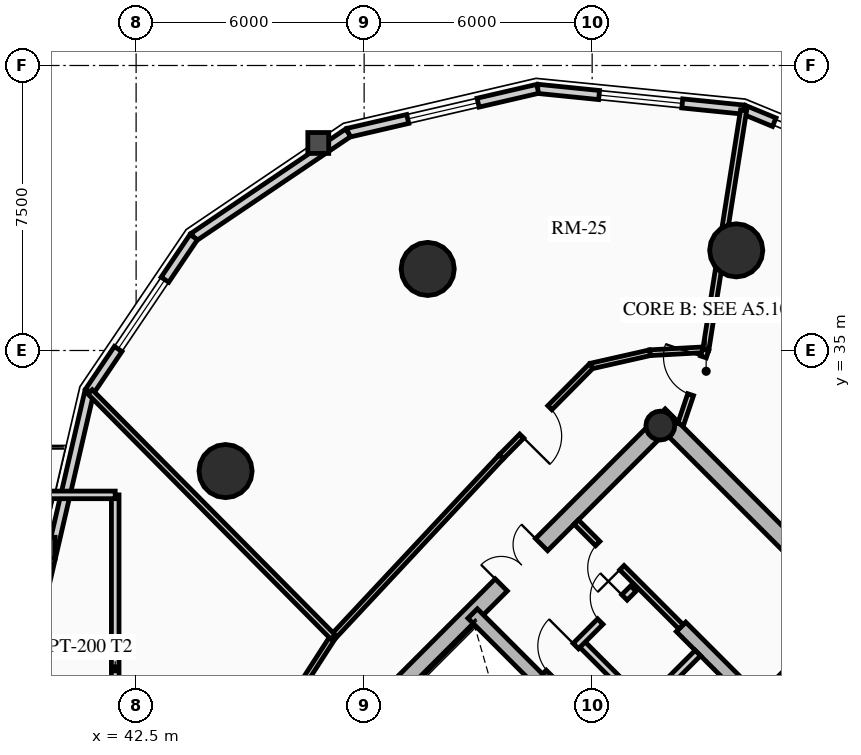
"""IFC4 building model, lengths in metres.
Left out: names, types, materials, properties, quantities, classifications, styles, units other than length and angle.
Written with IfcOpenShell. Run it as: python <this file> out.ifc"""

import sys

from ifc_helpers import new_model, si_unit, direction, frame, frame_2d, origin, origin_2d, place, context, subcontext, project, spatial, rectangle, circle, hollow_circle, extrude, source, transform, mapped, element, fill, save


model = new_model("IFC4")
c1 = context("Model", 3, precision=1e-05, world=origin(), true_north=direction((0.0, 1.0)))
c2 = subcontext(c1, "Body", "Model", "MODEL_VIEW")
j1 = project(units=[si_unit("LENGTHUNIT", "METRE"), si_unit("PLANEANGLEUNIT", "RADIAN")], contexts=[c1])
p1 = place(None, origin())
s1 = spatial("IfcSite", under=j1, at=p1, CompositionType="ELEMENT")
p2 = place(p1, origin())
s2 = spatial("IfcBuilding", under=s1, at=p2, CompositionType="ELEMENT")
p3 = place(p2, frame((0.0, 0.0, 136.6)))
s3 = spatial("IfcBuildingStorey", under=s2, at=p3, CompositionType="ELEMENT", Elevation=136.6)
p4 = place(p3, frame((66.303, 23.263, 0.0), z_axis=(0.0, 0.0, 1.0), x_axis=(-0.707106781187, 0.707106781187, 0.0)))
e1 = element("IfcWall", 1, at=p4, inside=s3, PredefinedType="SHEAR", context=c2, shape_type="SweptSolid", body=[
    extrude(rectangle(XDim=14.2, YDim=0.45, at=frame_2d((7.1, 0.0))), origin(), (0.0, 0.0, 1.0), 3.72),
])
p5 = place(p3, frame((48.856, 25.578, 0.0), z_axis=(0.0, 0.0, 1.0), x_axis=(0.707106781187, 0.707106781187, 0.0)))
e2 = element("IfcWall", 2, at=p5, inside=s3, PredefinedType="SHEAR", context=c2, shape_type="SweptSolid", body=[
    extrude(rectangle(XDim=10.7, YDim=0.45, at=frame_2d((5.35, 0.0))), origin(), (0.0, 0.0, 1.0), 3.72),
])
m1 = source(origin(), c2, "Body", "SweptSolid", [
    extrude(rectangle(XDim=1.5, YDim=2.02, at=frame_2d((0.75, 1.01))), frame((0.0, 0.235, 0.0), z_axis=(0.0, -1.0, 0.0), x_axis=(1.0, 0.0, 0.0)), (0.0, 0.0, 1.0), 0.47),
])
p6 = place(p5, frame((4.6, 0.0, 0.0)))
e3 = element("IfcOpeningElement", 3, at=p6, cuts=e2, PredefinedType="OPENING", context=c2, shape_type="MappedRepresentation", body=[
    mapped(m1, transform((0.0, 0.0, 0.0), x_axis=(1.0, 0.0, 0.0), y_axis=(0.0, 1.0, 0.0), z_axis=(0.0, 0.0, 1.0), scale=1.0)),
])
p7 = place(p3, frame((61.078, 18.355, 0.0), z_axis=(0.0, 0.0, 1.0), x_axis=(-0.707106781187, 0.707106781187, 0.0)))
e4 = element("IfcWall", 4, at=p7, inside=s3, PredefinedType="SHEAR", context=c2, shape_type="SweptSolid", body=[
    extrude(rectangle(XDim=13.75, YDim=0.35, at=frame_2d((6.875, 0.0))), origin(), (0.0, 0.0, 1.0), 3.72),
])
m2 = source(origin(), c2, "Body", "SweptSolid", [
    extrude(rectangle(XDim=1.1, YDim=2.015, at=frame_2d((0.55, 1.007))), frame((0.0, 0.185, 0.0), z_axis=(0.0, -1.0, 0.0), x_axis=(1.0, 0.0, 0.0)), (0.0, 0.0, 1.0), 0.37),
])
p8 = place(p7, frame((4.875, 0.0, 0.0)))
e5 = element("IfcOpeningElement", 5, at=p8, cuts=e4, PredefinedType="OPENING", context=c2, shape_type="MappedRepresentation", body=[
    mapped(m2, transform((0.0, 0.0, 0.0), x_axis=(1.0, 0.0, 0.0), y_axis=(0.0, 1.0, 0.0), z_axis=(0.0, 0.0, 1.0), scale=1.0)),
])
p9 = place(p7, frame((0.65, 0.0, 0.0)))
e6 = element("IfcOpeningElement", 6, at=p9, cuts=e4, PredefinedType="OPENING", context=c2, shape_type="MappedRepresentation", body=[
    mapped(m2, transform((0.0, 0.0, 0.0), x_axis=(1.0, 0.0, 0.0), y_axis=(0.0, 1.0, 0.0), z_axis=(0.0, 0.0, 1.0), scale=1.0)),
])
p10 = place(p7, frame((2.65, 0.0, 0.0)))
e7 = element("IfcOpeningElement", 7, at=p10, cuts=e4, PredefinedType="OPENING", context=c2, shape_type="MappedRepresentation", body=[
    mapped(m2, transform((0.0, 0.0, 0.0), x_axis=(1.0, 0.0, 0.0), y_axis=(0.0, 1.0, 0.0), z_axis=(0.0, 0.0, 1.0), scale=1.0)),
])
m3 = source(origin(), c2, "Body", "SweptSolid", [
    extrude(rectangle(XDim=1.15, YDim=2.02, at=frame_2d((0.575, 1.01))), frame((0.0, 0.185, 0.0), z_axis=(0.0, -1.0, 0.0), x_axis=(1.0, 0.0, 0.0)), (0.0, 0.0, 1.0), 0.37),
])
p11 = place(p7, frame((7.295, 0.0, 0.0)))
e8 = element("IfcOpeningElement", 8, at=p11, cuts=e4, PredefinedType="OPENING", context=c2, shape_type="MappedRepresentation", body=[
    mapped(m3, transform((0.0, 0.0, 0.0), x_axis=(1.0, 0.0, 0.0), y_axis=(0.0, 1.0, 0.0), z_axis=(0.0, 0.0, 1.0), scale=1.0)),
])
p12 = place(p3, frame((63.645, 20.922, 0.0), z_axis=(0.0, 0.0, 1.0), x_axis=(-0.70711946392, 0.707094098226, 0.0)))
e9 = element("IfcWall", 9, at=p12, inside=s3, PredefinedType="SHEAR", context=c2, shape_type="SweptSolid", body=[
    extrude(rectangle(XDim=9.625, YDim=0.35, at=frame_2d((4.812, 0.0))), origin(), (0.0, 0.0, 1.0), 3.72),
])
p13 = place(p12, frame((5.305, 0.0, 0.0)))
e10 = element("IfcOpeningElement", 10, at=p13, cuts=e9, PredefinedType="OPENING", context=c2, shape_type="MappedRepresentation", body=[
    mapped(m3, transform((0.0, 0.0, 0.0), x_axis=(1.0, 0.0, 0.0), y_axis=(0.0, 1.0, 0.0), z_axis=(0.0, 0.0, 1.0), scale=1.0)),
])
p14 = place(p3, frame((58.893, 25.674, 0.0), z_axis=(0.0, 0.0, 1.0), x_axis=(0.707106781187, 0.707106781187, 0.0)))
e11 = element("IfcWall", 11, at=p14, inside=s3, PredefinedType="SHEAR", context=c2, shape_type="SweptSolid", body=[
    extrude(rectangle(XDim=3.285, YDim=0.35, at=frame_2d((1.643, 0.0))), origin(), (0.0, 0.0, 1.0), 3.72),
])
p15 = place(p3, frame((56.294, 33.024, 0.0), z_axis=(0.0, 0.0, 1.0), x_axis=(0.707106781187, 0.707106781187, 0.0)))
e12 = element("IfcColumn", 12, at=p15, inside=s3, PredefinedType="COLUMN", context=c2, shape_type="SweptSolid", body=[
    extrude(hollow_circle(Radius=0.38, WallThickness=0.032, at=origin_2d()), origin(), (0.0, 0.0, 1.0), 3.72),
])
for number, where, z_axis, x_axis in (
    (13, (58.291, 37.635, 0.0), (0.0, 0.0, 1.0), (1.0, 0.0, 0.0)),
    (14, (50.173, 37.146, 0.0), (0.0, 0.0, 1.0), (1.0, 0.0, 0.0)),
    (15, (44.854, 31.827, 0.0), (0.0, 0.0, 1.0), (1.0, 0.0, 0.0)),
):
    element("IfcColumn", number, at=place(p3, frame(where, z_axis=z_axis, x_axis=x_axis)), inside=s3, PredefinedType="USERDEFINED", context=c2, shape_type="SweptSolid", body=[
        extrude(circle(Radius=0.7, at=origin_2d()), origin(), (0.0, 0.0, 1.0), 3.72),
    ])
p16 = place(p3, frame((58.487, 41.339, 0.0), z_axis=(0.0, 0.0, 1.0), x_axis=(0.924556017656, -0.381046152345, 0.0)))
e16 = element("IfcWall", 16, at=p16, inside=s3, PredefinedType="SOLIDWALL", context=c2, shape_type="SweptSolid", body=[
    extrude(rectangle(XDim=0.87, YDim=0.24, at=frame_2d((0.435, 0.0))), origin(), (0.0, 0.0, 1.0), 2.949),
])
p17 = place(p3, frame((53.067, 41.885, 0.0), z_axis=(0.0, 0.0, 1.0), x_axis=(0.994971754311, -0.10015591906, 0.0)))
e17 = element("IfcWall", 17, at=p17, inside=s3, PredefinedType="SOLIDWALL", context=c2, shape_type="SweptSolid", body=[
    extrude(rectangle(XDim=5.448, YDim=0.24, at=frame_2d((2.724, 0.0))), origin(), (0.0, 0.0, 1.0), 2.949),
])
m4 = source(origin(), c2, "Body", "SweptSolid", [
    extrude(rectangle(XDim=2.2, YDim=1.35, at=frame_2d((1.1, 0.675))), frame((0.0, 0.13, 0.0), z_axis=(0.0, -1.0, 0.0), x_axis=(1.0, 0.0, 0.0)), (0.0, 0.0, 1.0), 0.26),
])
p18 = place(p17, frame((1.624, 0.0, 0.65)))
e18 = element("IfcOpeningElement", 18, at=p18, cuts=e17, PredefinedType="OPENING", context=c2, shape_type="MappedRepresentation", body=[
    mapped(m4, transform((0.0, 0.0, 0.0), x_axis=(1.0, 0.0, 0.0), y_axis=(0.0, 1.0, 0.0), z_axis=(0.0, 0.0, 1.0), scale=1.0)),
])
p19 = place(p3, frame((48.08, 40.729, 0.0), z_axis=(0.0, 0.0, 1.0), x_axis=(0.974165631126, 0.225834725257, 0.0)))
e19 = element("IfcWall", 19, at=p19, inside=s3, PredefinedType="SOLIDWALL", context=c2, shape_type="SweptSolid", body=[
    extrude(rectangle(XDim=5.119, YDim=0.24, at=frame_2d((2.56, 0.0))), origin(), (0.0, 0.0, 1.0), 2.949),
])
m5 = source(origin(), c2, "Body", "SweptSolid", [
    extrude(rectangle(XDim=1.9, YDim=1.35, at=frame_2d((0.95, 0.675))), frame((0.0, 0.13, 0.0), z_axis=(0.0, -1.0, 0.0), x_axis=(1.0, 0.0, 0.0)), (0.0, 0.0, 1.0), 0.26),
])
p20 = place(p19, frame((1.609, 0.0, 0.65)))
e20 = element("IfcOpeningElement", 20, at=p20, cuts=e19, PredefinedType="OPENING", context=c2, shape_type="MappedRepresentation", body=[
    mapped(m5, transform((0.0, 0.0, 0.0), x_axis=(1.0, 0.0, 0.0), y_axis=(0.0, 1.0, 0.0), z_axis=(0.0, 0.0, 1.0), scale=1.0)),
])
p21 = place(p3, frame((44.015, 37.985, 0.0), z_axis=(0.0, 0.0, 1.0), x_axis=(0.828781148131, 0.559572880421, 0.0)))
e21 = element("IfcWall", 21, at=p21, inside=s3, PredefinedType="SOLIDWALL", context=c2, shape_type="SweptSolid", body=[
    extrude(rectangle(XDim=4.905, YDim=0.24, at=frame_2d((2.452, 0.0))), origin(), (0.0, 0.0, 1.0), 2.949),
])
p22 = place(p3, frame((41.271, 33.92, 0.0), z_axis=(0.0, 0.0, 1.0), x_axis=(0.559572880421, 0.828781148131, 0.0)))
e22 = element("IfcWall", 22, at=p22, inside=s3, PredefinedType="SOLIDWALL", context=c2, shape_type="SweptSolid", body=[
    extrude(rectangle(XDim=4.905, YDim=0.24, at=frame_2d((2.452, 0.0))), origin(), (0.0, 0.0, 1.0), 2.949),
])
p23 = place(p22, frame((1.352, 0.0, 0.65)))
e23 = element("IfcOpeningElement", 23, at=p23, cuts=e22, PredefinedType="OPENING", context=c2, shape_type="MappedRepresentation", body=[
    mapped(m4, transform((0.0, 0.0, 0.0), x_axis=(1.0, 0.0, 0.0), y_axis=(0.0, 1.0, 0.0), z_axis=(0.0, 0.0, 1.0), scale=1.0)),
])
p24 = place(p3, frame((40.115, 28.933, 0.0), z_axis=(0.0, 0.0, 1.0), x_axis=(0.225834725257, 0.974165631126, 0.0)))
e24 = element("IfcWall", 24, at=p24, inside=s3, PredefinedType="SOLIDWALL", context=c2, shape_type="SweptSolid", body=[
    extrude(rectangle(XDim=5.119, YDim=0.24, at=frame_2d((2.56, 0.0))), origin(), (0.0, 0.0, 1.0), 2.949),
])
p25 = place(p3, frame((41.95, 17.8, 0.0), z_axis=(0.0, 0.0, 1.0), x_axis=(0.0, 1.0, 0.0)))
e25 = element("IfcWall", 25, at=p25, inside=s3, PredefinedType="PARTITIONING", context=c2, shape_type="SweptSolid", body=[
    extrude(rectangle(XDim=13.4, YDim=0.2, at=frame_2d((6.7, 0.0))), origin(), (0.0, 0.0, 1.0), 2.949),
])
m6 = source(origin(), c2, "Body", "SweptSolid", [
    extrude(rectangle(XDim=1.8, YDim=2.05, at=frame_2d((0.9, 1.025))), frame((0.0, 0.11, 0.0), z_axis=(0.0, -1.0, 0.0), x_axis=(1.0, 0.0, 0.0)), (0.0, 0.0, 1.0), 0.22),
])
p26 = place(p25, frame((2.1, 0.0, 0.0)))
e26 = element("IfcOpeningElement", 26, at=p26, cuts=e25, PredefinedType="OPENING", context=c2, shape_type="MappedRepresentation", body=[
    mapped(m6, transform((0.0, 0.0, 0.0), x_axis=(1.0, 0.0, 0.0), y_axis=(0.0, 1.0, 0.0), z_axis=(0.0, 0.0, 1.0), scale=1.0)),
])
p27 = place(p3, frame((39.85, 31.2, 0.0), z_axis=(0.0, 0.0, 1.0), x_axis=(1.0, 0.0, 0.0)))
e27 = element("IfcWall", 27, at=p27, inside=s3, PredefinedType="PARTITIONING", context=c2, shape_type="SweptSolid", body=[
    extrude(rectangle(XDim=2.1, YDim=0.2, at=frame_2d((1.05, 0.0))), origin(), (0.0, 0.0, 1.0), 2.949),
])
p28 = place(p3, frame((54.961, 24.719, 0.0), z_axis=(0.0, 0.0, 1.0), x_axis=(0.707106781187, 0.707106781187, 0.0)))
e28 = element("IfcWall", 28, at=p28, inside=s3, PredefinedType="PARTITIONING", context=c2, shape_type="SweptSolid", body=[
    extrude(rectangle(XDim=3.28, YDim=0.2, at=frame_2d((1.64, 0.0))), origin(), (0.0, 0.0, 1.0), 3.425),
])
m7 = source(origin(), c2, "Body", "SweptSolid", [
    extrude(rectangle(XDim=0.9, YDim=2.005, at=frame_2d((0.45, 1.002))), frame((0.0, 0.11, 0.0), z_axis=(0.0, -1.0, 0.0), x_axis=(1.0, 0.0, 0.0)), (0.0, 0.0, 1.0), 0.22),
])
p29 = place(p28, frame((0.16, 0.0, 0.0)))
e29 = element("IfcOpeningElement", 29, at=p29, cuts=e28, PredefinedType="OPENING", context=c2, shape_type="MappedRepresentation", body=[
    mapped(m7, transform((0.0, 0.0, 0.0), x_axis=(1.0, 0.0, 0.0), y_axis=(0.0, 1.0, 0.0), z_axis=(0.0, 0.0, 1.0), scale=1.0)),
])
p30 = place(p3, frame((55.874, 25.631, 0.0), z_axis=(0.0, 0.0, 1.0), x_axis=(-0.707157639372, 0.707055919343, 0.0)))
e30 = element("IfcWall", 30, at=p30, inside=s3, PredefinedType="PARTITIONING", context=c2, shape_type="SweptSolid", body=[
    extrude(rectangle(XDim=2.4, YDim=0.2, at=frame_2d((1.2, 0.0))), origin(), (0.0, 0.0, 1.0), 3.425),
])
p31 = place(p3, frame((53.264, 26.416, 0.0), z_axis=(0.0, 0.0, 1.0), x_axis=(0.707106781187, 0.707106781187, 0.0)))
e31 = element("IfcWall", 31, at=p31, inside=s3, PredefinedType="PARTITIONING", context=c2, shape_type="SweptSolid", body=[
    extrude(rectangle(XDim=3.28, YDim=0.2, at=frame_2d((1.64, 0.0))), origin(), (0.0, 0.0, 1.0), 3.425),
])
m8 = source(origin(), c2, "Body", "SweptSolid", [
    extrude(rectangle(XDim=1.0, YDim=2.015, at=frame_2d((0.5, 1.007))), frame((0.0, 0.11, 0.0), z_axis=(0.0, -1.0, 0.0), x_axis=(1.0, 0.0, 0.0)), (0.0, 0.0, 1.0), 0.22),
])
p32 = place(p31, frame((0.14, 0.0, 0.0)))
e32 = element("IfcOpeningElement", 32, at=p32, cuts=e31, PredefinedType="OPENING", context=c2, shape_type="MappedRepresentation", body=[
    mapped(m8, transform((0.0, 0.0, 0.0), x_axis=(1.0, 0.0, 0.0), y_axis=(0.0, 1.0, 0.0), z_axis=(0.0, 0.0, 1.0), scale=1.0)),
])
p33 = place(p31, frame((2.05, 0.0, 0.0)))
e33 = element("IfcOpeningElement", 33, at=p33, cuts=e31, PredefinedType="OPENING", context=c2, shape_type="MappedRepresentation", body=[
    mapped(m7, transform((0.0, 0.0, 0.0), x_axis=(1.0, 0.0, 0.0), y_axis=(0.0, 1.0, 0.0), z_axis=(0.0, 0.0, 1.0), scale=1.0)),
])
p34 = place(p3, frame((56.839, 27.728, 0.0), z_axis=(0.0, 0.0, 1.0), x_axis=(-0.707106781187, 0.707106781187, 0.0)))
e34 = element("IfcWall", 34, at=p34, inside=s3, PredefinedType="PARTITIONING", context=c2, shape_type="SweptSolid", body=[
    extrude(rectangle(XDim=3.9, YDim=0.16, at=frame_2d((1.95, 0.0))), origin(), (0.0, 0.0, 1.0), 3.425),
])
m9 = source(origin(), c2, "Body", "SweptSolid", [
    extrude(rectangle(XDim=0.9, YDim=2.005, at=frame_2d((0.45, 1.002))), frame((0.0, 0.09, 0.0), z_axis=(0.0, -1.0, 0.0), x_axis=(1.0, 0.0, 0.0)), (0.0, 0.0, 1.0), 0.18),
])
p35 = place(p34, frame((2.2, 0.0, 0.0)))
e35 = element("IfcOpeningElement", 35, at=p35, cuts=e34, PredefinedType="OPENING", context=c2, shape_type="MappedRepresentation", body=[
    mapped(m9, transform((0.0, 0.0, 0.0), x_axis=(1.0, 0.0, 0.0), y_axis=(0.0, 1.0, 0.0), z_axis=(0.0, 0.0, 1.0), scale=1.0)),
])
p36 = place(p3, frame((57.491, 35.021, 0.0), z_axis=(0.0, 0.0, 1.0), x_axis=(-0.9985194771, -0.054395347698, 0.0)))
e36 = element("IfcWall", 36, at=p36, inside=s3, PredefinedType="PARTITIONING", context=c2, shape_type="SweptSolid", body=[
    extrude(rectangle(XDim=1.472, YDim=0.15, at=frame_2d((0.736, 0.0))), origin(), (0.0, 0.0, 1.0), 2.995),
])
p37 = place(p3, frame((56.021, 34.941, 0.0), z_axis=(0.0, 0.0, 1.0), x_axis=(-0.975309543901, -0.220842236847, 0.0)))
e37 = element("IfcWall", 37, at=p37, inside=s3, PredefinedType="PARTITIONING", context=c2, shape_type="SweptSolid", body=[
    extrude(rectangle(XDim=1.585, YDim=0.15, at=frame_2d((0.792, 0.0))), origin(), (0.0, 0.0, 1.0), 2.995),
])
p38 = place(p3, frame((54.475, 34.591, 0.0), z_axis=(0.0, 0.0, 1.0), x_axis=(-0.703869646439, -0.710329163714, 0.0)))
e38 = element("IfcWall", 38, at=p38, inside=s3, PredefinedType="PARTITIONING", context=c2, shape_type="SweptSolid", body=[
    extrude(rectangle(XDim=3.364, YDim=0.15, at=frame_2d((1.682, 0.0))), origin(), (0.0, 0.0, 1.0), 2.995),
])
m10 = source(origin(), c2, "Body", "SweptSolid", [
    extrude(rectangle(XDim=1.05, YDim=2.015, at=frame_2d((0.525, 1.007))), frame((0.0, 0.085, 0.0), z_axis=(0.0, -1.0, 0.0), x_axis=(1.0, 0.0, 0.0)), (0.0, 0.0, 1.0), 0.17),
])
p39 = place(p38, frame((1.546, 0.0, 0.0)))
e39 = element("IfcOpeningElement", 39, at=p39, cuts=e38, PredefinedType="OPENING", context=c2, shape_type="MappedRepresentation", body=[
    mapped(m10, transform((0.0, 0.0, 0.0), x_axis=(1.0, 0.0, 0.0), y_axis=(0.0, 1.0, 0.0), z_axis=(0.0, 0.0, 1.0), scale=1.0)),
])
p40 = place(p3, frame((52.107, 32.202, 0.0), z_axis=(0.0, 0.0, 1.0), x_axis=(-0.682605209028, -0.730787334734, 0.0)))
e40 = element("IfcWall", 40, at=p40, inside=s3, PredefinedType="PARTITIONING", context=c2, shape_type="SweptSolid", body=[
    extrude(rectangle(XDim=6.486, YDim=0.15, at=frame_2d((3.243, 0.0))), origin(), (0.0, 0.0, 1.0), 2.995),
])
p41 = place(p3, frame((47.68, 27.462, 0.0), z_axis=(0.0, 0.0, 1.0), x_axis=(-0.542097952486, -0.840315303865, 0.0)))
e41 = element("IfcWall", 41, at=p41, inside=s3, PredefinedType="PARTITIONING", context=c2, shape_type="SweptSolid", body=[
    extrude(rectangle(XDim=1.923, YDim=0.15, at=frame_2d((0.961, 0.0))), origin(), (0.0, 0.0, 1.0), 2.995),
])
p42 = place(p3, frame((57.491, 35.021, 0.0), z_axis=(0.0, 0.0, 1.0), x_axis=(0.155805268746, 0.98778779008, 0.0)))
e42 = element("IfcWall", 42, at=p42, inside=s3, PredefinedType="PARTITIONING", context=c2, shape_type="SweptSolid", body=[
    extrude(rectangle(XDim=6.376, YDim=0.16, at=frame_2d((3.188, 0.0))), origin(), (0.0, 0.0, 1.0), 2.949),
])
p43 = place(p3, frame((47.68, 27.462, 0.0), z_axis=(0.0, 0.0, 1.0), x_axis=(-0.703913074907, 0.710286127539, 0.0)))
e43 = element("IfcWall", 43, at=p43, inside=s3, PredefinedType="PARTITIONING", context=c2, shape_type="SweptSolid", body=[
    extrude(rectangle(XDim=9.079, YDim=0.16, at=frame_2d((4.54, 0.0))), origin(), (0.0, 0.0, 1.0), 2.512),
])
p44 = place(p3, frame((56.828, 33.056, 0.0), z_axis=(0.0, 0.0, 1.0), x_axis=(0.319439175969, 0.94760678177, 0.0)))
e44 = element("IfcWall", 44, at=p44, inside=s3, PredefinedType="PARTITIONING", context=c2, shape_type="SweptSolid", body=[
    extrude(rectangle(XDim=2.074, YDim=0.16, at=frame_2d((1.037, 0.0))), origin(), (0.0, 0.0, 1.0), 2.995),
])
m11 = source(origin(), c2, "Body", "SweptSolid", [
    extrude(rectangle(XDim=1.05, YDim=2.015, at=frame_2d((0.525, 1.007))), frame((0.0, 0.09, 0.0), z_axis=(0.0, -1.0, 0.0), x_axis=(1.0, 0.0, 0.0)), (0.0, 0.0, 1.0), 0.18),
])
p45 = place(p44, frame((0.824, 0.0, 0.0)))
e45 = element("IfcOpeningElement", 45, at=p45, cuts=e44, PredefinedType="OPENING", context=c2, shape_type="MappedRepresentation", body=[
    mapped(m11, transform((0.0, 0.0, 0.0), x_axis=(1.0, 0.0, 0.0), y_axis=(0.0, 1.0, 0.0), z_axis=(0.0, 0.0, 1.0), scale=1.0)),
])
m12 = source(origin(), c2, "Body", "SweptSolid", [
    extrude(rectangle(XDim=2.2, YDim=1.35, at=frame_2d((1.1, 0.675))), frame((0.0, 0.03, 0.0), z_axis=(0.0, -1.0, 0.0), x_axis=(1.0, 0.0, 0.0)), (0.0, 0.0, 1.0), 0.06),
])
p46 = place(p18, origin())
e46 = element("IfcWindow", 46, at=p46, inside=s3, PartitioningType="DOUBLE_PANEL_VERTICAL", PredefinedType="WINDOW", context=c2, shape_type="MappedRepresentation", body=[
    mapped(m12, transform((0.0, 0.0, 0.0), x_axis=(1.0, 0.0, 0.0), y_axis=(0.0, 1.0, 0.0), z_axis=(0.0, 0.0, 1.0), scale=1.0)),
])
fill(e18, e46)
m13 = source(origin(), c2, "Body", "SweptSolid", [
    extrude(rectangle(XDim=1.9, YDim=1.35, at=frame_2d((0.95, 0.675))), frame((0.0, 0.03, 0.0), z_axis=(0.0, -1.0, 0.0), x_axis=(1.0, 0.0, 0.0)), (0.0, 0.0, 1.0), 0.06),
])
p47 = place(p20, origin())
e47 = element("IfcWindow", 47, at=p47, inside=s3, PartitioningType="DOUBLE_PANEL_VERTICAL", PredefinedType="WINDOW", context=c2, shape_type="MappedRepresentation", body=[
    mapped(m13, transform((0.0, 0.0, 0.0), x_axis=(1.0, 0.0, 0.0), y_axis=(0.0, 1.0, 0.0), z_axis=(0.0, 0.0, 1.0), scale=1.0)),
])
fill(e20, e47)
p48 = place(p23, origin())
e48 = element("IfcWindow", 48, at=p48, inside=s3, PartitioningType="DOUBLE_PANEL_VERTICAL", PredefinedType="WINDOW", context=c2, shape_type="MappedRepresentation", body=[
    mapped(m12, transform((0.0, 0.0, 0.0), x_axis=(1.0, 0.0, 0.0), y_axis=(0.0, 1.0, 0.0), z_axis=(0.0, 0.0, 1.0), scale=1.0)),
])
fill(e23, e48)
m14 = source(origin(), c2, "Body", "SweptSolid", [
    extrude(rectangle(XDim=1.5, YDim=2.02, at=frame_2d((0.75, 1.01))), frame((0.0, 0.025, 0.0), z_axis=(0.0, -1.0, 0.0), x_axis=(1.0, 0.0, 0.0)), (0.0, 0.0, 1.0), 0.05),
])
p49 = place(p6, origin())
e49 = element("IfcDoor", 49, at=p49, inside=s3, OperationType="DOUBLE_DOOR_SINGLE_SWING", PredefinedType="DOOR", context=c2, shape_type="MappedRepresentation", body=[
    mapped(m14, transform((0.0, 0.0, 0.0), x_axis=(1.0, 0.0, 0.0), y_axis=(0.0, 1.0, 0.0), z_axis=(0.0, 0.0, 1.0), scale=1.0)),
])
fill(e3, e49)
m15 = source(origin(), c2, "Body", "SweptSolid", [
    extrude(rectangle(XDim=1.0, YDim=2.015, at=frame_2d((0.5, 1.007))), frame((0.0, 0.025, 0.0), z_axis=(0.0, -1.0, 0.0), x_axis=(1.0, 0.0, 0.0)), (0.0, 0.0, 1.0), 0.05),
])
p50 = place(p32, origin())
e50 = element("IfcDoor", 50, at=p50, inside=s3, OperationType="SINGLE_SWING_RIGHT", PredefinedType="DOOR", context=c2, shape_type="MappedRepresentation", body=[
    mapped(m15, transform((0.0, 0.0, 0.0), x_axis=(1.0, 0.0, 0.0), y_axis=(0.0, 1.0, 0.0), z_axis=(0.0, 0.0, 1.0), scale=1.0)),
])
fill(e32, e50)
m16 = source(origin(), c2, "Body", "SweptSolid", [
    extrude(rectangle(XDim=0.9, YDim=2.005, at=frame_2d((0.45, 1.002))), frame((0.0, 0.025, 0.0), z_axis=(0.0, -1.0, 0.0), x_axis=(1.0, 0.0, 0.0)), (0.0, 0.0, 1.0), 0.05),
])
p51 = place(p33, origin())
e51 = element("IfcDoor", 51, at=p51, inside=s3, OperationType="SINGLE_SWING_RIGHT", PredefinedType="DOOR", context=c2, shape_type="MappedRepresentation", body=[
    mapped(m16, transform((0.0, 0.0, 0.0), x_axis=(1.0, 0.0, 0.0), y_axis=(0.0, 1.0, 0.0), z_axis=(0.0, 0.0, 1.0), scale=1.0)),
])
fill(e33, e51)
p52 = place(p35, origin())
e52 = element("IfcDoor", 52, at=p52, inside=s3, OperationType="SINGLE_SWING_LEFT", PredefinedType="DOOR", context=c2, shape_type="MappedRepresentation", body=[
    mapped(m16, transform((0.0, 0.0, 0.0), x_axis=(1.0, 0.0, 0.0), y_axis=(0.0, 1.0, 0.0), z_axis=(0.0, 0.0, 1.0), scale=1.0)),
])
fill(e35, e52)
m17 = source(origin(), c2, "Body", "SweptSolid", [
    extrude(rectangle(XDim=1.05, YDim=2.015, at=frame_2d((0.525, 1.007))), frame((0.0, 0.025, 0.0), z_axis=(0.0, -1.0, 0.0), x_axis=(1.0, 0.0, 0.0)), (0.0, 0.0, 1.0), 0.05),
])
p53 = place(p45, origin())
e53 = element("IfcDoor", 53, at=p53, inside=s3, OperationType="SINGLE_SWING_RIGHT", PredefinedType="DOOR", context=c2, shape_type="MappedRepresentation", body=[
    mapped(m17, transform((0.0, 0.0, 0.0), x_axis=(1.0, 0.0, 0.0), y_axis=(0.0, 1.0, 0.0), z_axis=(0.0, 0.0, 1.0), scale=1.0)),
])
fill(e45, e53)
p54 = place(p39, origin())
e54 = element("IfcDoor", 54, at=p54, inside=s3, OperationType="SINGLE_SWING_RIGHT", PredefinedType="DOOR", context=c2, shape_type="MappedRepresentation", body=[
    mapped(m17, transform((0.0, 0.0, 0.0), x_axis=(1.0, 0.0, 0.0), y_axis=(0.0, 1.0, 0.0), z_axis=(0.0, 0.0, 1.0), scale=1.0)),
])
fill(e39, e54)
save(model, sys.argv[1])
